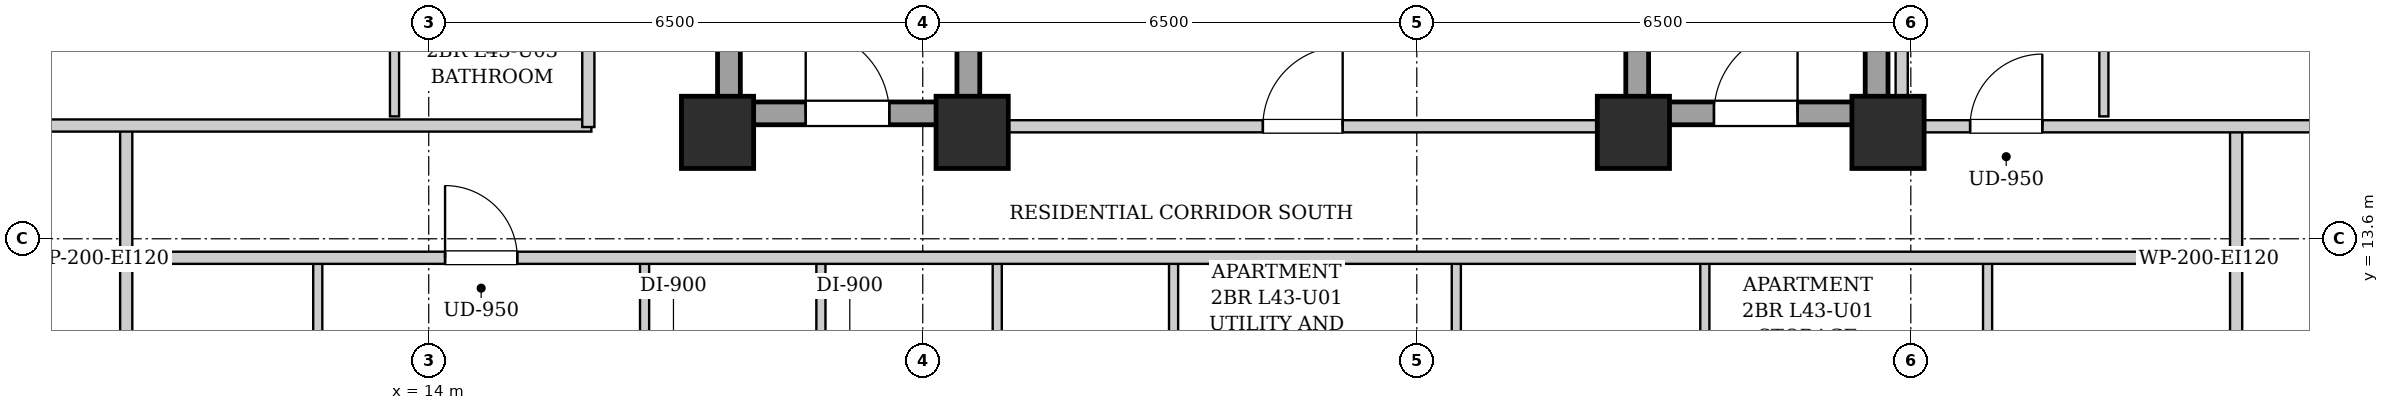
"""IFC4 building model, lengths in metres.
Left out: names, types, materials, properties, quantities, classifications, styles, units other than length and angle.
Written with IfcOpenShell. Run it as: python <this file> out.ifc"""

import sys

from ifc_helpers import new_model, si_unit, direction, frame, frame_2d, origin, origin_2d, place, context, subcontext, project, spatial, rectangle, extrude, element, fill, save


model = new_model("IFC4")
c1 = context("Model", 3, precision=1e-05, world=origin(), true_north=direction((0.0, 1.0)))
c2 = subcontext(c1, "Body", "Model", "MODEL_VIEW")
j1 = project(units=[si_unit("LENGTHUNIT", "METRE"), si_unit("PLANEANGLEUNIT", "RADIAN")], contexts=[c1])
p1 = place(None, origin())
s1 = spatial("IfcSite", under=j1, at=p1, CompositionType="ELEMENT")
p2 = place(p1, origin())
s2 = spatial("IfcBuilding", under=s1, at=p2, CompositionType="ELEMENT")
p3 = place(p2, frame((0.0, 0.0, 150.4)))
s3 = spatial("IfcBuildingStorey", under=s2, at=p3, CompositionType="ELEMENT", Elevation=150.4)
for number, where, z_axis, x_axis in (
    (1, (17.8, 15.0, 0.0), (0.0, 0.0, 1.0), (1.0, 0.0, 0.0)),
    (2, (21.15, 15.0, 0.0), (0.0, 0.0, 1.0), (1.0, 0.0, 0.0)),
    (3, (29.85, 15.0, 0.0), (0.0, 0.0, 1.0), (1.0, 0.0, 0.0)),
    (4, (33.2, 15.0, 0.0), (0.0, 0.0, 1.0), (1.0, 0.0, 0.0)),
):
    element("IfcColumn", number, at=place(p3, frame(where, z_axis=z_axis, x_axis=x_axis)), inside=s3, PredefinedType="COLUMN", context=c2, shape_type="SweptSolid", body=[
        extrude(rectangle(XDim=0.95, YDim=0.95, at=origin_2d()), origin(), (0.0, 0.0, 1.0), 3.25),
    ])
for number, where, z_axis, x_axis in (
    (5, (17.95, 15.1, 0.0), (0.0, 0.0, 1.0), (0.0, 1.0, 0.0)),
    (6, (21.1, 15.1, 0.0), (0.0, 0.0, 1.0), (0.0, 1.0, 0.0)),
):
    element("IfcWall", number, at=place(p3, frame(where, z_axis=z_axis, x_axis=x_axis)), inside=s3, PredefinedType="SHEAR", context=c2, shape_type="SweptSolid", body=[
        extrude(rectangle(XDim=9.0, YDim=0.3, at=frame_2d((4.5, 0.0))), origin(), (0.0, 0.0, 1.0), 2.99),
    ])
p4 = place(p3, frame((18.1, 15.25, 0.0), z_axis=(0.0, 0.0, 1.0), x_axis=(1.0, 0.0, 0.0)))
e7 = element("IfcWall", 7, at=p4, inside=s3, PredefinedType="SHEAR", context=c2, shape_type="SweptSolid", body=[
    extrude(rectangle(XDim=2.85, YDim=0.3, at=frame_2d((1.425, 0.0))), origin(), (0.0, 0.0, 1.0), 2.99),
])
p5 = place(p4, frame((0.86, 0.0, 0.0)))
e8 = element("IfcOpeningElement", 8, at=p5, cuts=e7, PredefinedType="OPENING", context=c2, shape_type="SweptSolid", body=[
    extrude(rectangle(XDim=1.1, YDim=2.05, at=frame_2d((0.55, 1.025))), frame((0.0, 0.16, 0.0), z_axis=(0.0, -1.0, 0.0), x_axis=(1.0, 0.0, 0.0)), (0.0, 0.0, 1.0), 0.32),
])
for number, where, z_axis, x_axis in (
    (9, (29.9, 15.1, 0.0), (0.0, 0.0, 1.0), (0.0, 1.0, 0.0)),
    (10, (33.05, 15.1, 0.0), (0.0, 0.0, 1.0), (0.0, 1.0, 0.0)),
):
    element("IfcWall", number, at=place(p3, frame(where, z_axis=z_axis, x_axis=x_axis)), inside=s3, PredefinedType="SHEAR", context=c2, shape_type="SweptSolid", body=[
        extrude(rectangle(XDim=9.0, YDim=0.3, at=frame_2d((4.5, 0.0))), origin(), (0.0, 0.0, 1.0), 2.99),
    ])
p6 = place(p3, frame((30.05, 15.25, 0.0), z_axis=(0.0, 0.0, 1.0), x_axis=(1.0, 0.0, 0.0)))
e11 = element("IfcWall", 11, at=p6, inside=s3, PredefinedType="SHEAR", context=c2, shape_type="SweptSolid", body=[
    extrude(rectangle(XDim=2.85, YDim=0.3, at=frame_2d((1.425, 0.0))), origin(), (0.0, 0.0, 1.0), 2.99),
])
p7 = place(p6, frame((0.86, 0.0, 0.0)))
e12 = element("IfcOpeningElement", 12, at=p7, cuts=e11, PredefinedType="OPENING", context=c2, shape_type="SweptSolid", body=[
    extrude(rectangle(XDim=1.1, YDim=2.05, at=frame_2d((0.55, 1.025))), frame((0.0, 0.16, 0.0), z_axis=(0.0, -1.0, 0.0), x_axis=(1.0, 0.0, 0.0)), (0.0, 0.0, 1.0), 0.32),
])
p8 = place(p3, frame((21.25, 15.08, 0.0), z_axis=(0.0, 0.0, 1.0), x_axis=(1.0, 0.0, 0.0)))
e13 = element("IfcWall", 13, at=p8, inside=s3, PredefinedType="PARTITIONING", context=c2, shape_type="SweptSolid", body=[
    extrude(rectangle(XDim=8.5, YDim=0.16, at=frame_2d((4.25, 0.0))), origin(), (0.0, 0.0, 1.0), 2.442),
])
p9 = place(p8, frame((3.725, 0.0, 0.0)))
e14 = element("IfcOpeningElement", 14, at=p9, cuts=e13, PredefinedType="OPENING", context=c2, shape_type="SweptSolid", body=[
    extrude(rectangle(XDim=1.05, YDim=2.05, at=frame_2d((0.525, 1.025))), frame((0.0, 0.09, 0.0), z_axis=(0.0, -1.0, 0.0), x_axis=(1.0, 0.0, 0.0)), (0.0, 0.0, 1.0), 0.18),
])
for number, where, z_axis, x_axis in (
    (15, (10.02, 13.35, 0.0), (0.0, 0.0, 1.0), (0.0, 1.0, 0.0)),
    (16, (37.78, 13.35, 0.0), (0.0, 0.0, 1.0), (0.0, 1.0, 0.0)),
):
    element("IfcWall", number, at=place(p3, frame(where, z_axis=z_axis, x_axis=x_axis)), inside=s3, PredefinedType="PARTITIONING", context=c2, shape_type="SweptSolid", body=[
        extrude(rectangle(XDim=1.74, YDim=0.16, at=frame_2d((0.87, 0.0))), origin(), (0.0, 0.0, 1.0), 2.99),
    ])
p10 = place(p3, frame((7.78, 15.09, 0.0), z_axis=(0.0, 0.0, 1.0), x_axis=(1.0, 0.0, 0.0)))
e17 = element("IfcWall", 17, at=p10, inside=s3, PredefinedType="PARTITIONING", context=c2, shape_type="SweptSolid", body=[
    extrude(rectangle(XDim=8.36, YDim=0.16, at=frame_2d((4.18, 0.0))), origin(), (0.0, 0.0, 1.0), 2.442),
])
for number, where, z_axis, x_axis in (
    (18, (10.02, 10.4, 0.0), (0.0, 0.0, 1.0), (0.0, 1.0, 0.0)),
    (19, (37.78, 10.4, 0.0), (0.0, 0.0, 1.0), (0.0, 1.0, 0.0)),
):
    element("IfcWall", number, at=place(p3, frame(where, z_axis=z_axis, x_axis=x_axis)), inside=s3, PredefinedType="PARTITIONING", context=c2, shape_type="SweptSolid", body=[
        extrude(rectangle(XDim=2.91, YDim=0.16, at=frame_2d((1.455, 0.0))), origin(), (0.0, 0.0, 1.0), 2.99),
    ])
p11 = place(p3, frame((12.54, 10.46, 0.0), z_axis=(0.0, 0.0, 1.0), x_axis=(0.0, 1.0, 0.0)))
e20 = element("IfcWall", 20, at=p11, inside=s3, PredefinedType="PARTITIONING", context=c2, shape_type="SweptSolid", body=[
    extrude(rectangle(XDim=2.85, YDim=0.12, at=frame_2d((1.425, 0.0))), origin(), (0.0, 0.0, 1.0), 2.99),
])
p12 = place(p11, frame((0.995, 0.0, 0.0)))
e21 = element("IfcOpeningElement", 21, at=p12, cuts=e20, PredefinedType="OPENING", context=c2, shape_type="SweptSolid", body=[
    extrude(rectangle(XDim=0.86, YDim=2.05, at=frame_2d((0.43, 1.025))), frame((0.0, 0.07, 0.0), z_axis=(0.0, -1.0, 0.0), x_axis=(1.0, 0.0, 0.0)), (0.0, 0.0, 1.0), 0.14),
])
p13 = place(p3, frame((16.84, 10.46, 0.0), z_axis=(0.0, 0.0, 1.0), x_axis=(0.0, 1.0, 0.0)))
e22 = element("IfcWall", 22, at=p13, inside=s3, PredefinedType="PARTITIONING", context=c2, shape_type="SweptSolid", body=[
    extrude(rectangle(XDim=2.85, YDim=0.12, at=frame_2d((1.425, 0.0))), origin(), (0.0, 0.0, 1.0), 2.99),
])
p14 = place(p13, frame((0.975, 0.0, 0.0)))
e23 = element("IfcOpeningElement", 23, at=p14, cuts=e22, PredefinedType="OPENING", context=c2, shape_type="SweptSolid", body=[
    extrude(rectangle(XDim=0.9, YDim=2.05, at=frame_2d((0.45, 1.025))), frame((0.0, 0.07, 0.0), z_axis=(0.0, -1.0, 0.0), x_axis=(1.0, 0.0, 0.0)), (0.0, 0.0, 1.0), 0.14),
])
p15 = place(p3, frame((19.16, 10.46, 0.0), z_axis=(0.0, 0.0, 1.0), x_axis=(0.0, 1.0, 0.0)))
e24 = element("IfcWall", 24, at=p15, inside=s3, PredefinedType="PARTITIONING", context=c2, shape_type="SweptSolid", body=[
    extrude(rectangle(XDim=2.85, YDim=0.12, at=frame_2d((1.425, 0.0))), origin(), (0.0, 0.0, 1.0), 2.99),
])
p16 = place(p15, frame((0.975, 0.0, 0.0)))
e25 = element("IfcOpeningElement", 25, at=p16, cuts=e24, PredefinedType="OPENING", context=c2, shape_type="SweptSolid", body=[
    extrude(rectangle(XDim=0.9, YDim=2.05, at=frame_2d((0.45, 1.025))), frame((0.0, 0.07, 0.0), z_axis=(0.0, -1.0, 0.0), x_axis=(1.0, 0.0, 0.0)), (0.0, 0.0, 1.0), 0.14),
])
p17 = place(p3, frame((21.48, 10.46, 0.0), z_axis=(0.0, 0.0, 1.0), x_axis=(0.0, 1.0, 0.0)))
e26 = element("IfcWall", 26, at=p17, inside=s3, PredefinedType="PARTITIONING", context=c2, shape_type="SweptSolid", body=[
    extrude(rectangle(XDim=2.85, YDim=0.12, at=frame_2d((1.425, 0.0))), origin(), (0.0, 0.0, 1.0), 2.99),
])
p18 = place(p17, frame((0.975, 0.0, 0.0)))
e27 = element("IfcOpeningElement", 27, at=p18, cuts=e26, PredefinedType="OPENING", context=c2, shape_type="SweptSolid", body=[
    extrude(rectangle(XDim=0.9, YDim=2.05, at=frame_2d((0.45, 1.025))), frame((0.0, 0.07, 0.0), z_axis=(0.0, -1.0, 0.0), x_axis=(1.0, 0.0, 0.0)), (0.0, 0.0, 1.0), 0.14),
])
p19 = place(p3, frame((23.8, 10.46, 0.0), z_axis=(0.0, 0.0, 1.0), x_axis=(0.0, 1.0, 0.0)))
e28 = element("IfcWall", 28, at=p19, inside=s3, PredefinedType="PARTITIONING", context=c2, shape_type="SweptSolid", body=[
    extrude(rectangle(XDim=2.85, YDim=0.12, at=frame_2d((1.425, 0.0))), origin(), (0.0, 0.0, 1.0), 2.99),
])
p20 = place(p19, frame((0.975, 0.0, 0.0)))
e29 = element("IfcOpeningElement", 29, at=p20, cuts=e28, PredefinedType="OPENING", context=c2, shape_type="SweptSolid", body=[
    extrude(rectangle(XDim=0.9, YDim=2.05, at=frame_2d((0.45, 1.025))), frame((0.0, 0.07, 0.0), z_axis=(0.0, -1.0, 0.0), x_axis=(1.0, 0.0, 0.0)), (0.0, 0.0, 1.0), 0.14),
])
p21 = place(p3, frame((27.52, 10.46, 0.0), z_axis=(0.0, 0.0, 1.0), x_axis=(0.0, 1.0, 0.0)))
e30 = element("IfcWall", 30, at=p21, inside=s3, PredefinedType="PARTITIONING", context=c2, shape_type="SweptSolid", body=[
    extrude(rectangle(XDim=2.85, YDim=0.12, at=frame_2d((1.425, 0.0))), origin(), (0.0, 0.0, 1.0), 2.99),
])
p22 = place(p21, frame((0.975, 0.0, 0.0)))
e31 = element("IfcOpeningElement", 31, at=p22, cuts=e30, PredefinedType="OPENING", context=c2, shape_type="SweptSolid", body=[
    extrude(rectangle(XDim=0.9, YDim=2.05, at=frame_2d((0.45, 1.025))), frame((0.0, 0.07, 0.0), z_axis=(0.0, -1.0, 0.0), x_axis=(1.0, 0.0, 0.0)), (0.0, 0.0, 1.0), 0.14),
])
p23 = place(p3, frame((30.79, 10.46, 0.0), z_axis=(0.0, 0.0, 1.0), x_axis=(0.0, 1.0, 0.0)))
e32 = element("IfcWall", 32, at=p23, inside=s3, PredefinedType="PARTITIONING", context=c2, shape_type="SweptSolid", body=[
    extrude(rectangle(XDim=2.85, YDim=0.12, at=frame_2d((1.425, 0.0))), origin(), (0.0, 0.0, 1.0), 2.99),
])
p24 = place(p23, frame((0.975, 0.0, 0.0)))
e33 = element("IfcOpeningElement", 33, at=p24, cuts=e32, PredefinedType="OPENING", context=c2, shape_type="SweptSolid", body=[
    extrude(rectangle(XDim=0.9, YDim=2.05, at=frame_2d((0.45, 1.025))), frame((0.0, 0.07, 0.0), z_axis=(0.0, -1.0, 0.0), x_axis=(1.0, 0.0, 0.0)), (0.0, 0.0, 1.0), 0.14),
])
p25 = place(p3, frame((34.51, 10.46, 0.0), z_axis=(0.0, 0.0, 1.0), x_axis=(0.0, 1.0, 0.0)))
e34 = element("IfcWall", 34, at=p25, inside=s3, PredefinedType="PARTITIONING", context=c2, shape_type="SweptSolid", body=[
    extrude(rectangle(XDim=2.85, YDim=0.12, at=frame_2d((1.425, 0.0))), origin(), (0.0, 0.0, 1.0), 2.99),
])
p26 = place(p25, frame((0.975, 0.0, 0.0)))
e35 = element("IfcOpeningElement", 35, at=p26, cuts=e34, PredefinedType="OPENING", context=c2, shape_type="SweptSolid", body=[
    extrude(rectangle(XDim=0.9, YDim=2.05, at=frame_2d((0.45, 1.025))), frame((0.0, 0.07, 0.0), z_axis=(0.0, -1.0, 0.0), x_axis=(1.0, 0.0, 0.0)), (0.0, 0.0, 1.0), 0.14),
])
p27 = place(p3, frame((13.55, 15.21, 0.0), z_axis=(0.0, 0.0, 1.0), x_axis=(0.0, 1.0, 0.0)))
e36 = element("IfcWall", 36, at=p27, inside=s3, PredefinedType="PARTITIONING", context=c2, shape_type="SweptSolid", body=[
    extrude(rectangle(XDim=2.3, YDim=0.12, at=frame_2d((1.15, 0.0))), origin(), (0.0, 0.0, 1.0), 2.99),
])
p28 = place(p3, frame((33.38, 15.08, 0.0), z_axis=(0.0, 0.0, 1.0), x_axis=(1.0, 0.0, 0.0)))
e37 = element("IfcWall", 37, at=p28, inside=s3, PredefinedType="PARTITIONING", context=c2, shape_type="SweptSolid", body=[
    extrude(rectangle(XDim=6.64, YDim=0.16, at=frame_2d((3.32, 0.0))), origin(), (0.0, 0.0, 1.0), 2.442),
])
p29 = place(p28, frame((0.9, 0.0, 0.0)))
e38 = element("IfcOpeningElement", 38, at=p29, cuts=e37, PredefinedType="OPENING", context=c2, shape_type="SweptSolid", body=[
    extrude(rectangle(XDim=0.95, YDim=2.1, at=frame_2d((0.475, 1.05))), frame((0.0, 0.09, 0.0), z_axis=(0.0, -1.0, 0.0), x_axis=(1.0, 0.0, 0.0)), (0.0, 0.0, 1.0), 0.18),
])
p30 = place(p3, frame((36.04, 15.21, 0.0), z_axis=(0.0, 0.0, 1.0), x_axis=(0.0, 1.0, 0.0)))
e39 = element("IfcWall", 39, at=p30, inside=s3, PredefinedType="PARTITIONING", context=c2, shape_type="SweptSolid", body=[
    extrude(rectangle(XDim=4.308, YDim=0.12, at=frame_2d((2.154, 0.0))), origin(), (0.0, 0.0, 1.0), 2.99),
])
p31 = place(p30, frame((1.704, 0.0, 0.0)))
e40 = element("IfcOpeningElement", 40, at=p31, cuts=e39, PredefinedType="OPENING", context=c2, shape_type="SweptSolid", body=[
    extrude(rectangle(XDim=0.9, YDim=2.05, at=frame_2d((0.45, 1.025))), frame((0.0, 0.07, 0.0), z_axis=(0.0, -1.0, 0.0), x_axis=(1.0, 0.0, 0.0)), (0.0, 0.0, 1.0), 0.14),
])
p32 = place(p3, frame((10.05, 13.35, 0.0), z_axis=(0.0, 0.0, 1.0), x_axis=(1.0, 0.0, 0.0)))
e41 = element("IfcWall", 41, at=p32, inside=s3, PredefinedType="PARTITIONING", context=c2, shape_type="SweptSolid", body=[
    extrude(rectangle(XDim=27.7, YDim=0.16, at=frame_2d((13.85, 0.0))), origin(), (0.0, 0.0, 1.0), 2.99),
])
p33 = place(p32, frame((4.165, 0.0, 0.0)))
e42 = element("IfcOpeningElement", 42, at=p33, cuts=e41, PredefinedType="OPENING", context=c2, shape_type="SweptSolid", body=[
    extrude(rectangle(XDim=0.95, YDim=2.1, at=frame_2d((0.475, 1.05))), frame((0.0, 0.09, 0.0), z_axis=(0.0, -1.0, 0.0), x_axis=(1.0, 0.0, 0.0)), (0.0, 0.0, 1.0), 0.18),
])
p34 = place(p3, frame((16.1, 15.07, 0.0), z_axis=(0.0, 0.0, 1.0), x_axis=(0.0, 1.0, 0.0)))
e43 = element("IfcWall", 43, at=p34, inside=s3, PredefinedType="PARTITIONING", context=c2, shape_type="SweptSolid", body=[
    extrude(rectangle(XDim=13.93, YDim=0.16, at=frame_2d((6.965, 0.0))), origin(), (0.0, 0.0, 1.0), 2.99),
])
p35 = place(p34, frame((4.385, 0.0, 0.0)))
e44 = element("IfcOpeningElement", 44, at=p35, cuts=e43, PredefinedType="OPENING", context=c2, shape_type="SweptSolid", body=[
    extrude(rectangle(XDim=0.95, YDim=2.1, at=frame_2d((0.475, 1.05))), frame((0.0, 0.09, 0.0), z_axis=(0.0, -1.0, 0.0), x_axis=(1.0, 0.0, 0.0)), (0.0, 0.0, 1.0), 0.18),
])
p36 = place(p3, frame((33.38, 15.02, 0.0), z_axis=(0.0, 0.0, 1.0), x_axis=(0.0, 1.0, 0.0)))
e45 = element("IfcWall", 45, at=p36, inside=s3, PredefinedType="PARTITIONING", context=c2, shape_type="SweptSolid", body=[
    extrude(rectangle(XDim=13.98, YDim=0.16, at=frame_2d((6.99, 0.0))), origin(), (0.0, 0.0, 1.0), 2.99),
])
p37 = place(p5, origin())
e46 = element("IfcDoor", 46, at=p37, inside=s3, OperationType="SINGLE_SWING_LEFT", PredefinedType="DOOR", context=c2, shape_type="SweptSolid", body=[
    extrude(rectangle(XDim=1.1, YDim=2.05, at=frame_2d((0.55, 1.025))), frame((0.0, 0.025, 0.0), z_axis=(0.0, -1.0, 0.0), x_axis=(1.0, 0.0, 0.0)), (0.0, 0.0, 1.0), 0.05),
])
fill(e8, e46)
p38 = place(p7, origin())
e47 = element("IfcDoor", 47, at=p38, inside=s3, OperationType="SINGLE_SWING_RIGHT", PredefinedType="DOOR", context=c2, shape_type="SweptSolid", body=[
    extrude(rectangle(XDim=1.1, YDim=2.05, at=frame_2d((0.55, 1.025))), frame((0.0, 0.025, 0.0), z_axis=(0.0, -1.0, 0.0), x_axis=(1.0, 0.0, 0.0)), (0.0, 0.0, 1.0), 0.05),
])
fill(e12, e47)
p39 = place(p9, origin())
e48 = element("IfcDoor", 48, at=p39, inside=s3, OperationType="SINGLE_SWING_RIGHT", PredefinedType="DOOR", context=c2, shape_type="SweptSolid", body=[
    extrude(rectangle(XDim=1.05, YDim=2.05, at=frame_2d((0.525, 1.025))), frame((0.0, 0.025, 0.0), z_axis=(0.0, -1.0, 0.0), x_axis=(1.0, 0.0, 0.0)), (0.0, 0.0, 1.0), 0.05),
])
fill(e14, e48)
p40 = place(p29, origin())
e49 = element("IfcDoor", 49, at=p40, inside=s3, OperationType="SINGLE_SWING_RIGHT", PredefinedType="DOOR", context=c2, shape_type="SweptSolid", body=[
    extrude(rectangle(XDim=0.95, YDim=2.1, at=frame_2d((0.475, 1.05))), frame((0.0, 0.025, 0.0), z_axis=(0.0, -1.0, 0.0), x_axis=(1.0, 0.0, 0.0)), (0.0, 0.0, 1.0), 0.05),
])
fill(e38, e49)
p41 = place(p33, origin())
e50 = element("IfcDoor", 50, at=p41, inside=s3, OperationType="SINGLE_SWING_LEFT", PredefinedType="DOOR", context=c2, shape_type="SweptSolid", body=[
    extrude(rectangle(XDim=0.95, YDim=2.1, at=frame_2d((0.475, 1.05))), frame((0.0, 0.025, 0.0), z_axis=(0.0, -1.0, 0.0), x_axis=(1.0, 0.0, 0.0)), (0.0, 0.0, 1.0), 0.05),
])
fill(e42, e50)
save(model, sys.argv[1])
